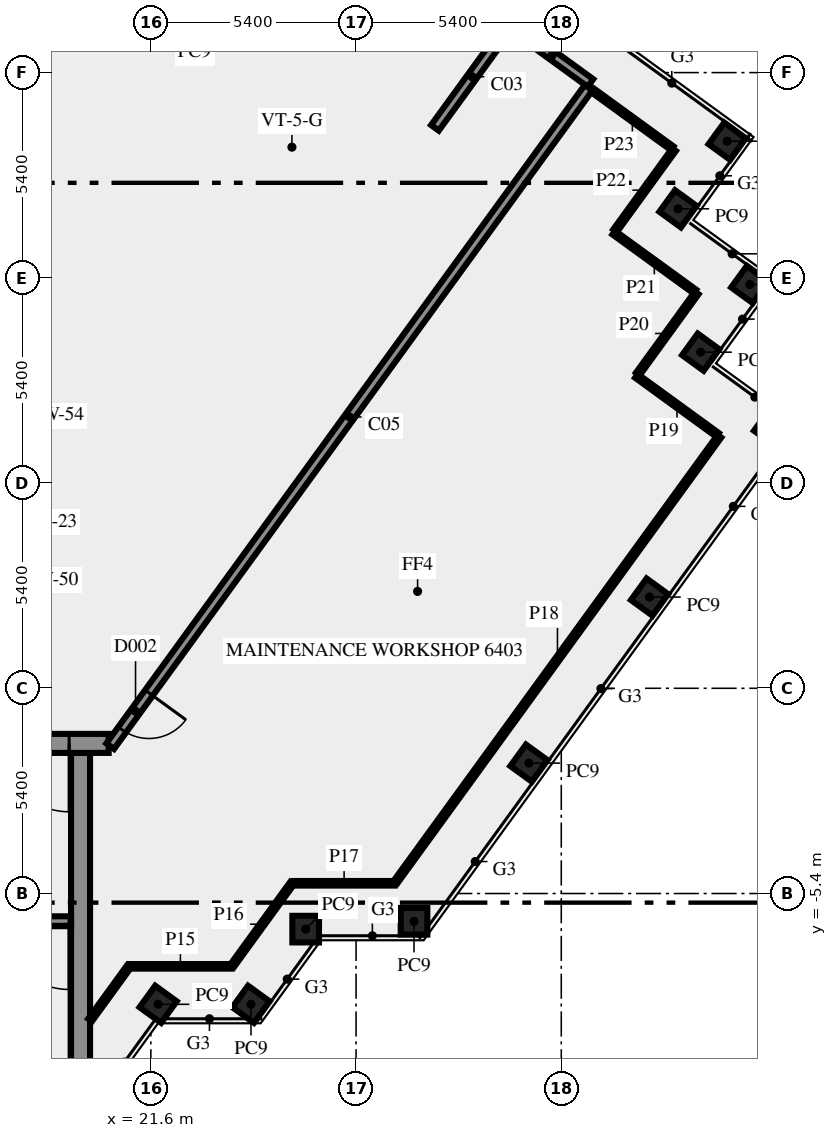
"""IFC4 building model, lengths in metres.
Left out: names, types, materials, properties, quantities, classifications, styles, units other than length and angle.
Written with IfcOpenShell. Run it as: python <this file> out.ifc"""

import sys

from ifc_helpers import new_model, si_unit, direction, frame, frame_2d, origin, origin_2d, place, context, subcontext, project, spatial, rectangle, extrude, element, fill, save


model = new_model("IFC4")
c1 = context("Model", 3, precision=1e-05, world=origin(), true_north=direction((0.0, 1.0)))
c2 = subcontext(c1, "Body", "Model", "MODEL_VIEW")
j1 = project(units=[si_unit("LENGTHUNIT", "METRE"), si_unit("PLANEANGLEUNIT", "RADIAN")], contexts=[c1])
p1 = place(None, origin())
s1 = spatial("IfcSite", under=j1, at=p1, CompositionType="ELEMENT")
p2 = place(p1, origin())
s2 = spatial("IfcBuilding", under=s1, at=p2, CompositionType="ELEMENT")
p3 = place(p2, frame((0.0, 0.0, 273.0)))
s3 = spatial("IfcBuildingStorey", under=s2, at=p3, CompositionType="ELEMENT", Elevation=273.0)
for number, where, z_axis, x_axis in (
    (1, (21.792, -8.315, 0.0), (0.0, 0.0, 1.0), (0.588, 0.809, 0.0)),
    (2, (24.235, -8.315, 0.0), (0.0, 0.0, 1.0), (0.588, 0.809, 0.0)),
    (3, (25.674, -6.337, 0.0), (0.0, 0.0, 1.0), (1.0, 0.0, 0.0)),
    (4, (28.525, -6.13, 0.0), (0.0, 0.0, 1.0), (1.0, 0.0, 0.0)),
    (5, (31.548, -1.969, 0.0), (0.0, 0.0, 1.0), (0.588, 0.809, 0.0)),
    (6, (34.722, 2.4, 0.0), (0.0, 0.0, 1.0), (0.588, 0.809, 0.0)),
    (7, (37.96, 6.855, 0.0), (0.0, 0.0, 1.0), (0.588, 0.809, 0.0)),
    (8, (36.068, 8.844, 0.0), (0.0, 0.0, 1.0), (0.588, 0.809, 0.0)),
    (9, (37.36, 10.625, 0.0), (0.0, 0.0, 1.0), (0.588, 0.809, 0.0)),
    (10, (35.471, 12.616, 0.0), (0.0, 0.0, 1.0), (-0.809, 0.588, 0.0)),
    (11, (36.765, 14.395, 0.0), (0.0, 0.0, 1.0), (-0.809, 0.588, 0.0)),
):
    element("IfcColumn", number, at=place(p3, frame(where, z_axis=z_axis, x_axis=x_axis)), inside=s3, PredefinedType="COLUMN", context=c2, shape_type="SweptSolid", body=[
        extrude(rectangle(XDim=0.7, YDim=0.7, at=origin_2d()), origin(), (0.0, 0.0, 1.0), 7.65),
    ])
p4 = place(p3, frame((19.75, -10.5, 0.0), z_axis=(0.0, 0.0, 1.0), x_axis=(0.0, 1.0, 0.0)))
e12 = element("IfcWall", 12, at=p4, inside=s3, PredefinedType="SHEAR", context=c2, shape_type="SweptSolid", body=[
    extrude(rectangle(XDim=8.8, YDim=0.5, at=frame_2d((4.4, 0.0))), origin(), (0.0, 0.0, 1.0), 7.65),
])
p5 = place(p3, frame((19.5, -6.125, 0.0), z_axis=(0.0, 0.0, 1.0), x_axis=(-1.0, 0.0, 0.0)))
e13 = element("IfcWall", 13, at=p5, inside=s3, PredefinedType="SHEAR", context=c2, shape_type="SweptSolid", body=[
    extrude(rectangle(XDim=8.05, YDim=0.25, at=frame_2d((4.025, 0.0))), origin(), (0.0, 0.0, 1.0), 7.65),
])
p6 = place(p5, frame((0.05, 0.0, 0.0)))
e14 = element("IfcOpeningElement", 14, at=p6, cuts=e13, PredefinedType="OPENING", context=c2, shape_type="SweptSolid", body=[
    extrude(rectangle(XDim=1.8, YDim=2.1, at=frame_2d((0.9, 1.05))), frame((0.0, 0.135, 0.0), z_axis=(0.0, -1.0, 0.0), x_axis=(1.0, 0.0, 0.0)), (0.0, 0.0, 1.0), 0.27),
])
p7 = place(p3, frame((20.49, -1.45, 0.0), z_axis=(0.0, 0.0, 1.0), x_axis=(-1.0, 0.0, 0.0)))
e15 = element("IfcWall", 15, at=p7, inside=s3, PredefinedType="SHEAR", context=c2, shape_type="SweptSolid", body=[
    extrude(rectangle(XDim=40.98, YDim=0.5, at=frame_2d((20.49, 0.0))), origin(), (0.0, 0.0, 1.0), 7.65),
])
p8 = place(p7, frame((38.14, 0.0, 0.0)))
e16 = element("IfcOpeningElement", 16, at=p8, cuts=e15, PredefinedType="OPENING", context=c2, shape_type="SweptSolid", body=[
    extrude(rectangle(XDim=1.8, YDim=2.1, at=frame_2d((0.9, 1.05))), frame((0.0, 0.26, 0.0), z_axis=(0.0, -1.0, 0.0), x_axis=(1.0, 0.0, 0.0)), (0.0, 0.0, 1.0), 0.52),
])
p9 = place(p7, frame((36.728, 0.0, 0.0)))
e17 = element("IfcOpeningElement", 17, at=p9, cuts=e15, PredefinedType="OPENING", context=c2, shape_type="SweptSolid", body=[
    extrude(rectangle(XDim=0.8, YDim=2.1, at=frame_2d((0.4, 1.05))), frame((0.0, 0.26, 0.0), z_axis=(0.0, -1.0, 0.0), x_axis=(1.0, 0.0, 0.0)), (0.0, 0.0, 1.0), 0.52),
])
p10 = place(p7, frame((35.153, 0.0, 0.0)))
e18 = element("IfcOpeningElement", 18, at=p10, cuts=e15, PredefinedType="OPENING", context=c2, shape_type="SweptSolid", body=[
    extrude(rectangle(XDim=0.8, YDim=2.1, at=frame_2d((0.4, 1.05))), frame((0.0, 0.26, 0.0), z_axis=(0.0, -1.0, 0.0), x_axis=(1.0, 0.0, 0.0)), (0.0, 0.0, 1.0), 0.52),
])
p11 = place(p7, frame((32.94, 0.0, 0.0)))
e19 = element("IfcOpeningElement", 19, at=p11, cuts=e15, PredefinedType="OPENING", context=c2, shape_type="SweptSolid", body=[
    extrude(rectangle(XDim=0.9, YDim=2.1, at=frame_2d((0.45, 1.05))), frame((0.0, 0.26, 0.0), z_axis=(0.0, -1.0, 0.0), x_axis=(1.0, 0.0, 0.0)), (0.0, 0.0, 1.0), 0.52),
])
p12 = place(p7, frame((20.74, 0.0, 0.0)))
e20 = element("IfcOpeningElement", 20, at=p12, cuts=e15, PredefinedType="OPENING", context=c2, shape_type="SweptSolid", body=[
    extrude(rectangle(XDim=2.0, YDim=2.1, at=frame_2d((1.0, 1.05))), frame((0.0, 0.26, 0.0), z_axis=(0.0, -1.0, 0.0), x_axis=(1.0, 0.0, 0.0)), (0.0, 0.0, 1.0), 0.52),
])
p13 = place(p7, frame((14.903, 0.0, 0.0)))
e21 = element("IfcOpeningElement", 21, at=p13, cuts=e15, PredefinedType="OPENING", context=c2, shape_type="SweptSolid", body=[
    extrude(rectangle(XDim=0.9, YDim=2.1, at=frame_2d((0.45, 1.05))), frame((0.0, 0.26, 0.0), z_axis=(0.0, -1.0, 0.0), x_axis=(1.0, 0.0, 0.0)), (0.0, 0.0, 1.0), 0.52),
])
p14 = place(p7, frame((12.54, 0.0, 0.0)))
e22 = element("IfcOpeningElement", 22, at=p14, cuts=e15, PredefinedType="OPENING", context=c2, shape_type="SweptSolid", body=[
    extrude(rectangle(XDim=0.9, YDim=2.1, at=frame_2d((0.45, 1.05))), frame((0.0, 0.26, 0.0), z_axis=(0.0, -1.0, 0.0), x_axis=(1.0, 0.0, 0.0)), (0.0, 0.0, 1.0), 0.52),
])
p15 = place(p7, frame((9.877, 0.0, 0.0)))
e23 = element("IfcOpeningElement", 23, at=p15, cuts=e15, PredefinedType="OPENING", context=c2, shape_type="SweptSolid", body=[
    extrude(rectangle(XDim=0.9, YDim=2.1, at=frame_2d((0.45, 1.05))), frame((0.0, 0.26, 0.0), z_axis=(0.0, -1.0, 0.0), x_axis=(1.0, 0.0, 0.0)), (0.0, 0.0, 1.0), 0.52),
])
p16 = place(p7, frame((7.14, 0.0, 0.0)))
e24 = element("IfcOpeningElement", 24, at=p16, cuts=e15, PredefinedType="OPENING", context=c2, shape_type="SweptSolid", body=[
    extrude(rectangle(XDim=0.9, YDim=2.1, at=frame_2d((0.45, 1.05))), frame((0.0, 0.26, 0.0), z_axis=(0.0, -1.0, 0.0), x_axis=(1.0, 0.0, 0.0)), (0.0, 0.0, 1.0), 0.52),
])
p17 = place(p7, frame((4.19, 0.0, 0.0)))
e25 = element("IfcOpeningElement", 25, at=p17, cuts=e15, PredefinedType="OPENING", context=c2, shape_type="SweptSolid", body=[
    extrude(rectangle(XDim=0.9, YDim=2.1, at=frame_2d((0.45, 1.05))), frame((0.0, 0.26, 0.0), z_axis=(0.0, -1.0, 0.0), x_axis=(1.0, 0.0, 0.0)), (0.0, 0.0, 1.0), 0.52),
])
p18 = place(p7, frame((1.04, 0.0, 0.0)))
e26 = element("IfcOpeningElement", 26, at=p18, cuts=e15, PredefinedType="OPENING", context=c2, shape_type="SweptSolid", body=[
    extrude(rectangle(XDim=1.8, YDim=2.1, at=frame_2d((0.9, 1.05))), frame((0.0, 0.26, 0.0), z_axis=(0.0, -1.0, 0.0), x_axis=(1.0, 0.0, 0.0)), (0.0, 0.0, 1.0), 0.52),
])
p19 = place(p3, frame((29.076, 14.746, 0.0), z_axis=(0.0, 0.0, 1.0), x_axis=(0.587765806913, 0.809031121913, 0.0)))
e27 = element("IfcWall", 27, at=p19, inside=s3, PredefinedType="SOLIDWALL", context=c2, shape_type="SweptSolid", body=[
    extrude(rectangle(XDim=3.327, YDim=0.25, at=frame_2d((1.663, 0.0))), origin(), (0.0, 0.0, 1.0), 7.65),
])
p20 = place(p3, frame((31.155, 17.389, 0.0), z_axis=(0.0, 0.0, 1.0), x_axis=(0.809011863271, -0.587792314586, 0.0)))
e28 = element("IfcWall", 28, at=p20, inside=s3, PredefinedType="SOLIDWALL", context=c2, shape_type="SweptSolid", body=[
    extrude(rectangle(XDim=2.488, YDim=0.25, at=frame_2d((1.244, 0.0))), origin(), (0.0, 0.0, 1.0), 7.65),
])
p21 = place(p3, frame((33.12, 15.803, 0.0), z_axis=(0.0, 0.0, 1.0), x_axis=(-0.587781896694, -0.80901943235, 0.0)))
e29 = element("IfcWall", 29, at=p21, inside=s3, PredefinedType="SOLIDWALL", context=c2, shape_type="SweptSolid", body=[
    extrude(rectangle(XDim=21.417, YDim=0.25, at=frame_2d((10.708, 0.0))), origin(), (0.0, 0.0, 1.0), 7.65),
])
p22 = place(p21, frame((19.684, 0.0, 0.0)))
e30 = element("IfcOpeningElement", 30, at=p22, cuts=e29, PredefinedType="OPENING", context=c2, shape_type="SweptSolid", body=[
    extrude(rectangle(XDim=1.2, YDim=2.1, at=frame_2d((0.6, 1.05))), frame((0.0, 0.135, 0.0), z_axis=(0.0, -1.0, 0.0), x_axis=(1.0, 0.0, 0.0)), (0.0, 0.0, 1.0), 0.27),
])
p23 = place(p3, frame((21.028, -7.316, 0.0), z_axis=(0.0, 0.0, 1.0), x_axis=(1.0, 0.0, 0.0)))
e31 = element("IfcWall", 31, at=p23, inside=s3, PredefinedType="PARTITIONING", context=c2, shape_type="SweptSolid", body=[
    extrude(rectangle(XDim=2.7, YDim=0.12, at=frame_2d((1.35, 0.0))), origin(), (0.0, 0.0, 1.0), 7.65),
])
p24 = place(p3, frame((23.751, -7.284, 0.0), z_axis=(0.0, 0.0, 1.0), x_axis=(0.587669599435, 0.809101008466, 0.0)))
e32 = element("IfcWall", 32, at=p24, inside=s3, PredefinedType="PARTITIONING", context=c2, shape_type="SweptSolid", body=[
    extrude(rectangle(XDim=2.66, YDim=0.12, at=frame_2d((1.33, 0.0))), origin(), (0.0, 0.0, 1.0), 7.65),
])
p25 = place(p3, frame((25.355, -5.131, 0.0), z_axis=(0.0, 0.0, 1.0), x_axis=(1.0, 0.0, 0.0)))
e33 = element("IfcWall", 33, at=p25, inside=s3, PredefinedType="PARTITIONING", context=c2, shape_type="SweptSolid", body=[
    extrude(rectangle(XDim=2.66, YDim=0.12, at=frame_2d((1.33, 0.0))), origin(), (0.0, 0.0, 1.0), 7.65),
])
p26 = place(p3, frame((28.039, -5.099, 0.0), z_axis=(0.0, 0.0, 1.0), x_axis=(0.587767157512, 0.809030140693, 0.0)))
e34 = element("IfcWall", 34, at=p26, inside=s3, PredefinedType="PARTITIONING", context=c2, shape_type="SweptSolid", body=[
    extrude(rectangle(XDim=14.5, YDim=0.12, at=frame_2d((7.25, 0.0))), origin(), (0.0, 0.0, 1.0), 7.65),
])
p27 = place(p3, frame((36.512, 6.667, 0.0), z_axis=(0.0, 0.0, 1.0), x_axis=(-0.808848086336, 0.588017664046, 0.0)))
e35 = element("IfcWall", 35, at=p27, inside=s3, PredefinedType="PARTITIONING", context=c2, shape_type="SweptSolid", body=[
    extrude(rectangle(XDim=2.639, YDim=0.12, at=frame_2d((1.319, 0.0))), origin(), (0.0, 0.0, 1.0), 7.65),
])
p28 = place(p3, frame((34.413, 8.268, 0.0), z_axis=(0.0, 0.0, 1.0), x_axis=(0.58748418219, 0.809235649039, 0.0)))
e36 = element("IfcWall", 36, at=p28, inside=s3, PredefinedType="PARTITIONING", context=c2, shape_type="SweptSolid", body=[
    extrude(rectangle(XDim=2.64, YDim=0.12, at=frame_2d((1.32, 0.0))), origin(), (0.0, 0.0, 1.0), 7.65),
])
p29 = place(p3, frame((35.916, 10.439, 0.0), z_axis=(0.0, 0.0, 1.0), x_axis=(-0.809024092902, 0.587775481884, 0.0)))
e37 = element("IfcWall", 37, at=p29, inside=s3, PredefinedType="PARTITIONING", context=c2, shape_type="SweptSolid", body=[
    extrude(rectangle(XDim=2.638, YDim=0.12, at=frame_2d((1.319, 0.0))), origin(), (0.0, 0.0, 1.0), 7.65),
])
p30 = place(p3, frame((33.816, 12.039, 0.0), z_axis=(0.0, 0.0, 1.0), x_axis=(0.587423619839, 0.809279612282, 0.0)))
e38 = element("IfcWall", 38, at=p30, inside=s3, PredefinedType="PARTITIONING", context=c2, shape_type="SweptSolid", body=[
    extrude(rectangle(XDim=2.64, YDim=0.12, at=frame_2d((1.32, 0.0))), origin(), (0.0, 0.0, 1.0), 7.65),
])
p31 = place(p3, frame((35.319, 14.21, 0.0), z_axis=(0.0, 0.0, 1.0), x_axis=(-0.809000907741, 0.587807393008, 0.0)))
e39 = element("IfcWall", 39, at=p31, inside=s3, PredefinedType="PARTITIONING", context=c2, shape_type="SweptSolid", body=[
    extrude(rectangle(XDim=2.591, YDim=0.12, at=frame_2d((1.295, 0.0))), origin(), (0.0, 0.0, 1.0), 7.65),
])
p32 = place(p3, frame((20.0, -8.73, 0.0), z_axis=(0.0, 0.0, 1.0), x_axis=(0.588018712203, 0.808847324345, 0.0)))
e40 = element("IfcWall", 40, at=p32, inside=s3, PredefinedType="PARTITIONING", context=c2, shape_type="SweptSolid", body=[
    extrude(rectangle(XDim=1.708, YDim=0.12, at=frame_2d((0.854, 0.0))), origin(), (0.0, 0.0, 1.0), 7.65),
])
p33 = place(p6, origin())
e41 = element("IfcDoor", 41, at=p33, inside=s3, OperationType="DOUBLE_DOOR_SINGLE_SWING", PredefinedType="DOOR", context=c2, shape_type="SweptSolid", body=[
    extrude(rectangle(XDim=1.8, YDim=2.1, at=frame_2d((0.9, 1.05))), frame((0.0, 0.025, 0.0), z_axis=(0.0, -1.0, 0.0), x_axis=(1.0, 0.0, 0.0)), (0.0, 0.0, 1.0), 0.05),
])
fill(e14, e41)
p34 = place(p18, origin())
e42 = element("IfcDoor", 42, at=p34, inside=s3, OperationType="DOUBLE_DOOR_SINGLE_SWING", PredefinedType="DOOR", context=c2, shape_type="SweptSolid", body=[
    extrude(rectangle(XDim=1.8, YDim=2.1, at=frame_2d((0.9, 1.05))), frame((0.0, 0.025, 0.0), z_axis=(0.0, -1.0, 0.0), x_axis=(1.0, 0.0, 0.0)), (0.0, 0.0, 1.0), 0.05),
])
fill(e26, e42)
p35 = place(p22, origin())
e43 = element("IfcDoor", 43, at=p35, inside=s3, OperationType="SINGLE_SWING_RIGHT", PredefinedType="DOOR", context=c2, shape_type="SweptSolid", body=[
    extrude(rectangle(XDim=1.2, YDim=2.1, at=frame_2d((0.6, 1.05))), frame((0.0, 0.025, 0.0), z_axis=(0.0, -1.0, 0.0), x_axis=(1.0, 0.0, 0.0)), (0.0, 0.0, 1.0), 0.05),
])
fill(e30, e43)
save(model, sys.argv[1])
